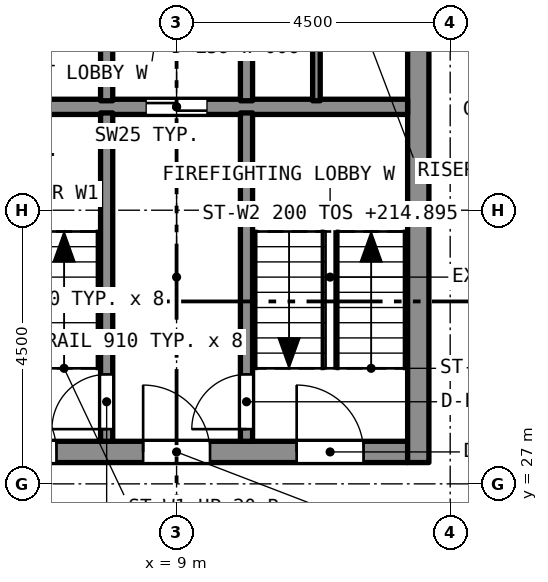
"""IFC4 building model, lengths in metres.
Left out: names, types, materials, properties, quantities, classifications, styles, units other than length and angle.
Written with IfcOpenShell. Run it as: python <this file> out.ifc"""

import sys

from ifc_helpers import new_model, si_unit, direction, frame, frame_2d, origin, place, context, subcontext, project, spatial, rectangle, extrude, element, fill, save


model = new_model("IFC4")
c1 = context("Model", 3, precision=1e-05, world=origin(), true_north=direction((0.0, 1.0)))
c2 = subcontext(c1, "Body", "Model", "MODEL_VIEW")
j1 = project(units=[si_unit("LENGTHUNIT", "METRE"), si_unit("PLANEANGLEUNIT", "RADIAN")], contexts=[c1])
p1 = place(None, origin())
s1 = spatial("IfcSite", under=j1, at=p1, CompositionType="ELEMENT")
p2 = place(p1, origin())
s2 = spatial("IfcBuilding", under=s1, at=p2, CompositionType="ELEMENT")
p3 = place(p2, frame((0.0, 0.0, 213.295)))
s3 = spatial("IfcBuildingStorey", under=s2, at=p3, CompositionType="ELEMENT", Elevation=213.295)
p4 = place(p3, frame((5.2, 27.525, 0.0), z_axis=(0.0, 0.0, 1.0), x_axis=(1.0, 0.0, 0.0)))
e1 = element("IfcWall", 1, at=p4, inside=s3, PredefinedType="SOLIDWALL", context=c2, shape_type="SweptSolid", body=[
    extrude(rectangle(XDim=7.6, YDim=0.35, at=frame_2d((3.8, 0.0))), origin(), (0.0, 0.0, 1.0), 3.2),
])
p5 = place(p4, frame((0.725, 0.0, 0.0)))
e2 = element("IfcOpeningElement", 2, at=p5, cuts=e1, PredefinedType="OPENING", context=c2, shape_type="SweptSolid", body=[
    extrude(rectangle(XDim=1.1, YDim=2.1, at=frame_2d((0.55, 1.05))), frame((0.0, 0.185, 0.0), z_axis=(0.0, -1.0, 0.0), x_axis=(1.0, 0.0, 0.0)), (0.0, 0.0, 1.0), 0.37),
])
p6 = place(p4, frame((3.25, 0.0, 0.0)))
e3 = element("IfcOpeningElement", 3, at=p6, cuts=e1, PredefinedType="OPENING", context=c2, shape_type="SweptSolid", body=[
    extrude(rectangle(XDim=1.1, YDim=2.1, at=frame_2d((0.55, 1.05))), frame((0.0, 0.185, 0.0), z_axis=(0.0, -1.0, 0.0), x_axis=(1.0, 0.0, 0.0)), (0.0, 0.0, 1.0), 0.37),
])
p7 = place(p4, frame((5.775, 0.0, 0.0)))
e4 = element("IfcOpeningElement", 4, at=p7, cuts=e1, PredefinedType="OPENING", context=c2, shape_type="SweptSolid", body=[
    extrude(rectangle(XDim=1.1, YDim=2.1, at=frame_2d((0.55, 1.05))), frame((0.0, 0.185, 0.0), z_axis=(0.0, -1.0, 0.0), x_axis=(1.0, 0.0, 0.0)), (0.0, 0.0, 1.0), 0.37),
])
p8 = place(p3, frame((12.975, 27.35, 0.0), z_axis=(0.0, 0.0, 1.0), x_axis=(0.0, 1.0, 0.0)))
e5 = element("IfcWall", 5, at=p8, inside=s3, PredefinedType="SOLIDWALL", context=c2, shape_type="SweptSolid", body=[
    extrude(rectangle(XDim=12.8, YDim=0.35, at=frame_2d((6.4, 0.0))), origin(), (0.0, 0.0, 1.0), 3.2),
])
p9 = place(p8, frame((10.75, 0.0, 0.0)))
e6 = element("IfcOpeningElement", 6, at=p9, cuts=e5, PredefinedType="OPENING", context=c2, shape_type="SweptSolid", body=[
    extrude(rectangle(XDim=1.1, YDim=2.1, at=frame_2d((0.55, 1.05))), frame((0.0, 0.185, 0.0), z_axis=(0.0, -1.0, 0.0), x_axis=(1.0, 0.0, 0.0)), (0.0, 0.0, 1.0), 0.37),
])
p10 = place(p8, frame((8.6, 0.0, 0.0)))
e7 = element("IfcOpeningElement", 7, at=p10, cuts=e5, PredefinedType="OPENING", context=c2, shape_type="SweptSolid", body=[
    extrude(rectangle(XDim=1.2, YDim=2.1, at=frame_2d((0.6, 1.05))), frame((0.0, 0.185, 0.0), z_axis=(0.0, -1.0, 0.0), x_axis=(1.0, 0.0, 0.0)), (0.0, 0.0, 1.0), 0.37),
])
p11 = place(p3, frame((5.2, 33.2, 0.0), z_axis=(0.0, 0.0, 1.0), x_axis=(1.0, 0.0, 0.0)))
e8 = element("IfcWall", 8, at=p11, inside=s3, PredefinedType="SOLIDWALL", context=c2, shape_type="SweptSolid", body=[
    extrude(rectangle(XDim=7.6, YDim=0.25, at=frame_2d((3.8, 0.0))), origin(), (0.0, 0.0, 1.0), 2.9),
])
p12 = place(p11, frame((3.3, 0.0, 0.0)))
e9 = element("IfcOpeningElement", 9, at=p12, cuts=e8, PredefinedType="OPENING", context=c2, shape_type="SweptSolid", body=[
    extrude(rectangle(XDim=1.0, YDim=2.1, at=frame_2d((0.5, 1.05))), frame((0.0, 0.135, 0.0), z_axis=(0.0, -1.0, 0.0), x_axis=(1.0, 0.0, 0.0)), (0.0, 0.0, 1.0), 0.27),
])
p13 = place(p3, frame((7.85, 27.7, 0.0), z_axis=(0.0, 0.0, 1.0), x_axis=(0.0, 1.0, 0.0)))
e10 = element("IfcWall", 10, at=p13, inside=s3, PredefinedType="SOLIDWALL", context=c2, shape_type="SweptSolid", body=[
    extrude(rectangle(XDim=5.4, YDim=0.2, at=frame_2d((2.7, 0.0))), origin(), (0.0, 0.0, 1.0), 2.9),
])
p14 = place(p13, frame((0.2, 0.0, 0.0)))
e11 = element("IfcOpeningElement", 11, at=p14, cuts=e10, PredefinedType="OPENING", context=c2, shape_type="SweptSolid", body=[
    extrude(rectangle(XDim=0.9, YDim=2.1, at=frame_2d((0.45, 1.05))), frame((0.0, 0.11, 0.0), z_axis=(0.0, -1.0, 0.0), x_axis=(1.0, 0.0, 0.0)), (0.0, 0.0, 1.0), 0.22),
])
p15 = place(p3, frame((10.15, 27.7, 0.0), z_axis=(0.0, 0.0, 1.0), x_axis=(0.0, 1.0, 0.0)))
e12 = element("IfcWall", 12, at=p15, inside=s3, PredefinedType="SOLIDWALL", context=c2, shape_type="SweptSolid", body=[
    extrude(rectangle(XDim=5.4, YDim=0.2, at=frame_2d((2.7, 0.0))), origin(), (0.0, 0.0, 1.0), 2.9),
])
p16 = place(p15, frame((0.2, 0.0, 0.0)))
e13 = element("IfcOpeningElement", 13, at=p16, cuts=e12, PredefinedType="OPENING", context=c2, shape_type="SweptSolid", body=[
    extrude(rectangle(XDim=0.9, YDim=2.1, at=frame_2d((0.45, 1.05))), frame((0.0, 0.11, 0.0), z_axis=(0.0, -1.0, 0.0), x_axis=(1.0, 0.0, 0.0)), (0.0, 0.0, 1.0), 0.22),
])
for number, where, z_axis, x_axis in (
    (14, (7.85, 33.3, 0.0), (0.0, 0.0, 1.0), (0.0, 1.0, 0.0)),
    (15, (10.15, 33.3, 0.0), (0.0, 0.0, 1.0), (0.0, 1.0, 0.0)),
):
    element("IfcWall", number, at=place(p3, frame(where, z_axis=z_axis, x_axis=x_axis)), inside=s3, PredefinedType="SOLIDWALL", context=c2, shape_type="SweptSolid", body=[
        extrude(rectangle(XDim=2.3, YDim=0.2, at=frame_2d((1.15, 0.0))), origin(), (0.0, 0.0, 1.0), 2.9),
    ])
p17 = place(p3, frame((11.3, 33.3, 0.0), z_axis=(0.0, 0.0, 1.0), x_axis=(0.0, 1.0, 0.0)))
e16 = element("IfcWall", 16, at=p17, inside=s3, PredefinedType="PARTITIONING", context=c2, shape_type="SweptSolid", body=[
    extrude(rectangle(XDim=2.3, YDim=0.125, at=frame_2d((1.15, 0.0))), origin(), (0.0, 0.0, 1.0), 2.9),
])
p18 = place(p14, origin())
e17 = element("IfcDoor", 17, at=p18, inside=s3, OperationType="SINGLE_SWING_LEFT", PredefinedType="DOOR", context=c2, shape_type="SweptSolid", body=[
    extrude(rectangle(XDim=0.9, YDim=2.1, at=frame_2d((0.45, 1.05))), frame((0.0, 0.025, 0.0), z_axis=(0.0, -1.0, 0.0), x_axis=(1.0, 0.0, 0.0)), (0.0, 0.0, 1.0), 0.05),
])
fill(e11, e17)
p19 = place(p16, origin())
e18 = element("IfcDoor", 18, at=p19, inside=s3, OperationType="SINGLE_SWING_LEFT", PredefinedType="DOOR", context=c2, shape_type="SweptSolid", body=[
    extrude(rectangle(XDim=0.9, YDim=2.1, at=frame_2d((0.45, 1.05))), frame((0.0, 0.025, 0.0), z_axis=(0.0, -1.0, 0.0), x_axis=(1.0, 0.0, 0.0)), (0.0, 0.0, 1.0), 0.05),
])
fill(e13, e18)
p20 = place(p12, origin())
e19 = element("IfcDoor", 19, at=p20, inside=s3, OperationType="SLIDING_TO_LEFT", PredefinedType="DOOR", context=c2, shape_type="SweptSolid", body=[
    extrude(rectangle(XDim=1.0, YDim=2.1, at=frame_2d((0.5, 1.05))), frame((0.0, 0.025, 0.0), z_axis=(0.0, -1.0, 0.0), x_axis=(1.0, 0.0, 0.0)), (0.0, 0.0, 1.0), 0.05),
])
fill(e9, e19)
p21 = place(p5, origin())
e20 = element("IfcDoor", 20, at=p21, inside=s3, OperationType="SINGLE_SWING_LEFT", PredefinedType="DOOR", context=c2, shape_type="SweptSolid", body=[
    extrude(rectangle(XDim=1.1, YDim=2.1, at=frame_2d((0.55, 1.05))), frame((0.0, 0.025, 0.0), z_axis=(0.0, -1.0, 0.0), x_axis=(1.0, 0.0, 0.0)), (0.0, 0.0, 1.0), 0.05),
])
fill(e2, e20)
p22 = place(p6, origin())
e21 = element("IfcDoor", 21, at=p22, inside=s3, OperationType="SINGLE_SWING_LEFT", PredefinedType="DOOR", context=c2, shape_type="SweptSolid", body=[
    extrude(rectangle(XDim=1.1, YDim=2.1, at=frame_2d((0.55, 1.05))), frame((0.0, 0.025, 0.0), z_axis=(0.0, -1.0, 0.0), x_axis=(1.0, 0.0, 0.0)), (0.0, 0.0, 1.0), 0.05),
])
fill(e3, e21)
p23 = place(p7, origin())
e22 = element("IfcDoor", 22, at=p23, inside=s3, OperationType="SINGLE_SWING_LEFT", PredefinedType="DOOR", context=c2, shape_type="SweptSolid", body=[
    extrude(rectangle(XDim=1.1, YDim=2.1, at=frame_2d((0.55, 1.05))), frame((0.0, 0.025, 0.0), z_axis=(0.0, -1.0, 0.0), x_axis=(1.0, 0.0, 0.0)), (0.0, 0.0, 1.0), 0.05),
])
fill(e4, e22)
save(model, sys.argv[1])
